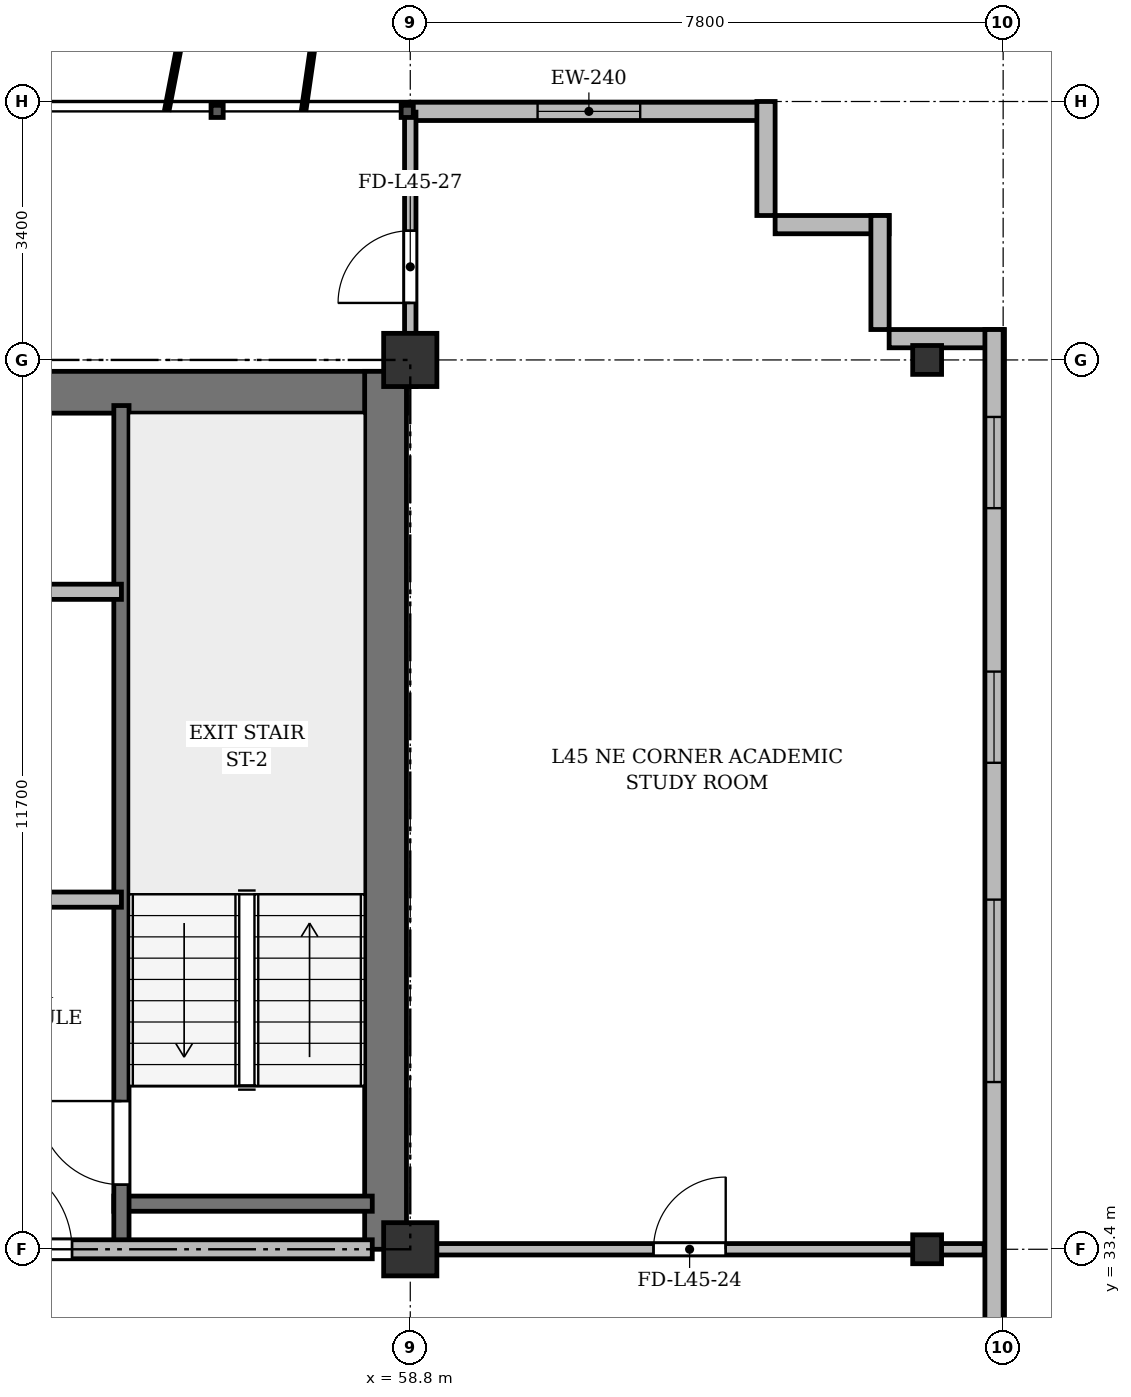
"""IFC4 building model, lengths in metres.
Left out: names, types, materials, properties, quantities, classifications, styles, units other than length and angle.
Written with IfcOpenShell. Run it as: python <this file> out.ifc"""

import sys

from ifc_helpers import new_model, si_unit, direction, frame, frame_2d, origin, origin_2d, place, context, subcontext, project, spatial, rectangle, i_section, extrude, source, transform, mapped, element, fill, save


model = new_model("IFC4")
c1 = context("Model", 3, precision=1e-05, world=origin(), true_north=direction((0.0, 1.0)))
c2 = subcontext(c1, "Body", "Model", "MODEL_VIEW")
j1 = project(units=[si_unit("LENGTHUNIT", "METRE"), si_unit("PLANEANGLEUNIT", "RADIAN")], contexts=[c1])
p1 = place(None, origin())
s1 = spatial("IfcSite", under=j1, at=p1, CompositionType="ELEMENT")
p2 = place(p1, origin())
s2 = spatial("IfcBuilding", under=s1, at=p2, CompositionType="ELEMENT")
p3 = place(p2, frame((0.0, 0.0, 171.7)))
s3 = spatial("IfcBuildingStorey", under=s2, at=p3, CompositionType="ELEMENT", Elevation=171.7)
m1 = source(origin(), c2, "Body", "SweptSolid", [
    extrude(rectangle(XDim=0.7, YDim=0.7, at=origin_2d()), origin(), (0.0, 0.0, 1.0), 3.6),
])
for number, where, z_axis, x_axis in (
    (1, (58.8, 33.4, 0.0), (0.0, 0.0, 1.0), (1.0, 0.0, 0.0)),
    (2, (58.8, 45.1, 0.0), (0.0, 0.0, 1.0), (1.0, 0.0, 0.0)),
):
    element("IfcColumn", number, at=place(p3, frame(where, z_axis=z_axis, x_axis=x_axis)), inside=s3, PredefinedType="COLUMN", context=c2, shape_type="MappedRepresentation", body=[
        mapped(m1, transform((0.0, 0.0, 0.0), x_axis=(1.0, 0.0, 0.0), y_axis=(0.0, 1.0, 0.0), z_axis=(0.0, 0.0, 1.0), scale=1.0)),
    ])
m2 = source(origin(), c2, "Body", "SweptSolid", [
    extrude(i_section(OverallWidth=0.38, OverallDepth=0.38, WebThickness=0.02, FlangeThickness=0.03, at=origin_2d()), origin(), (0.0, 0.0, 1.0), 3.6),
])
for number, where, z_axis, x_axis in (
    (3, (65.6, 33.4, 0.0), (0.0, 0.0, 1.0), (1.0, 0.0, 0.0)),
    (4, (65.6, 45.1, 0.0), (0.0, 0.0, 1.0), (1.0, 0.0, 0.0)),
):
    element("IfcColumn", number, at=place(p3, frame(where, z_axis=z_axis, x_axis=x_axis)), inside=s3, PredefinedType="COLUMN", context=c2, shape_type="MappedRepresentation", body=[
        mapped(m2, transform((0.0, 0.0, 0.0), x_axis=(1.0, 0.0, 0.0), y_axis=(0.0, 1.0, 0.0), z_axis=(0.0, 0.0, 1.0), scale=1.0)),
    ])
p4 = place(p3, frame((58.8, 48.37, 0.0), z_axis=(0.0, 0.0, 1.0), x_axis=(1.0, 0.0, 0.0)))
e5 = element("IfcWall", 5, at=p4, inside=s3, PredefinedType="SOLIDWALL", context=c2, shape_type="SweptSolid", body=[
    extrude(rectangle(XDim=4.7, YDim=0.24, at=frame_2d((2.35, 0.0))), origin(), (0.0, 0.0, 1.0), 3.35),
])
p5 = place(p4, frame((1.675, 0.0, 0.9)))
e6 = element("IfcOpeningElement", 6, at=p5, cuts=e5, PredefinedType="OPENING", context=c2, shape_type="SweptSolid", body=[
    extrude(rectangle(XDim=1.35, YDim=1.5, at=frame_2d((0.675, 0.75))), frame((0.0, 0.13, 0.0), z_axis=(0.0, -1.0, 0.0), x_axis=(1.0, 0.0, 0.0)), (0.0, 0.0, 1.0), 0.26),
])
for number, where, z_axis, x_axis in (
    (7, (63.48, 48.5, 0.0), (0.0, 0.0, 1.0), (0.0, -1.0, 0.0)),
    (8, (63.6, 46.88, 0.0), (0.0, 0.0, 1.0), (1.0, 0.0, 0.0)),
    (9, (64.98, 47.0, 0.0), (0.0, 0.0, 1.0), (0.0, -1.0, 0.0)),
    (10, (65.1, 45.38, 0.0), (0.0, 0.0, 1.0), (1.0, 0.0, 0.0)),
):
    element("IfcWall", number, at=place(p3, frame(where, z_axis=z_axis, x_axis=x_axis)), inside=s3, PredefinedType="SOLIDWALL", context=c2, shape_type="SweptSolid", body=[
        extrude(rectangle(XDim=1.5, YDim=0.24, at=frame_2d((0.75, 0.0))), origin(), (0.0, 0.0, 1.0), 3.35),
    ])
p6 = place(p3, frame((66.48, 45.5, 0.0), z_axis=(0.0, 0.0, 1.0), x_axis=(0.0, -1.0, 0.0)))
e11 = element("IfcWall", 11, at=p6, inside=s3, PredefinedType="SOLIDWALL", context=c2, shape_type="SweptSolid", body=[
    extrude(rectangle(XDim=39.2, YDim=0.24, at=frame_2d((19.6, 0.0))), origin(), (0.0, 0.0, 1.0), 3.35),
])
p7 = place(p6, frame((36.55, 0.0, 0.92)))
e12 = element("IfcOpeningElement", 12, at=p7, cuts=e11, PredefinedType="OPENING", context=c2, shape_type="SweptSolid", body=[
    extrude(rectangle(XDim=1.2, YDim=1.65, at=frame_2d((0.6, 0.825))), frame((0.0, 0.13, 0.0), z_axis=(0.0, -1.0, 0.0), x_axis=(1.0, 0.0, 0.0)), (0.0, 0.0, 1.0), 0.26),
])
p8 = place(p6, frame((32.9, 0.0, 0.92)))
e13 = element("IfcOpeningElement", 13, at=p8, cuts=e11, PredefinedType="OPENING", context=c2, shape_type="SweptSolid", body=[
    extrude(rectangle(XDim=2.4, YDim=2.1, at=frame_2d((1.2, 1.05))), frame((0.0, 0.13, 0.0), z_axis=(0.0, -1.0, 0.0), x_axis=(1.0, 0.0, 0.0)), (0.0, 0.0, 1.0), 0.26),
])
p9 = place(p6, frame((28.7, 0.0, 0.92)))
e14 = element("IfcOpeningElement", 14, at=p9, cuts=e11, PredefinedType="OPENING", context=c2, shape_type="SweptSolid", body=[
    extrude(rectangle(XDim=2.4, YDim=2.1, at=frame_2d((1.2, 1.05))), frame((0.0, 0.13, 0.0), z_axis=(0.0, -1.0, 0.0), x_axis=(1.0, 0.0, 0.0)), (0.0, 0.0, 1.0), 0.26),
])
p10 = place(p6, frame((21.5, 0.0, 0.92)))
e15 = element("IfcOpeningElement", 15, at=p10, cuts=e11, PredefinedType="OPENING", context=c2, shape_type="SweptSolid", body=[
    extrude(rectangle(XDim=2.4, YDim=2.1, at=frame_2d((1.2, 1.05))), frame((0.0, 0.13, 0.0), z_axis=(0.0, -1.0, 0.0), x_axis=(1.0, 0.0, 0.0)), (0.0, 0.0, 1.0), 0.26),
])
p11 = place(p6, frame((7.5, 0.0, 0.92)))
e16 = element("IfcOpeningElement", 16, at=p11, cuts=e11, PredefinedType="OPENING", context=c2, shape_type="SweptSolid", body=[
    extrude(rectangle(XDim=2.4, YDim=2.1, at=frame_2d((1.2, 1.05))), frame((0.0, 0.13, 0.0), z_axis=(0.0, -1.0, 0.0), x_axis=(1.0, 0.0, 0.0)), (0.0, 0.0, 1.0), 0.26),
])
p12 = place(p6, frame((4.5, 0.0, 0.92)))
e17 = element("IfcOpeningElement", 17, at=p12, cuts=e11, PredefinedType="OPENING", context=c2, shape_type="SweptSolid", body=[
    extrude(rectangle(XDim=1.2, YDim=1.65, at=frame_2d((0.6, 0.825))), frame((0.0, 0.13, 0.0), z_axis=(0.0, -1.0, 0.0), x_axis=(1.0, 0.0, 0.0)), (0.0, 0.0, 1.0), 0.26),
])
p13 = place(p6, frame((1.15, 0.0, 0.92)))
e18 = element("IfcOpeningElement", 18, at=p13, cuts=e11, PredefinedType="OPENING", context=c2, shape_type="SweptSolid", body=[
    extrude(rectangle(XDim=1.2, YDim=1.65, at=frame_2d((0.6, 0.825))), frame((0.0, 0.13, 0.0), z_axis=(0.0, -1.0, 0.0), x_axis=(1.0, 0.0, 0.0)), (0.0, 0.0, 1.0), 0.26),
])
p14 = place(p3, frame((15.65, 44.675, 0.0), z_axis=(0.0, 0.0, 1.0), x_axis=(1.0, 0.0, 0.0)))
e19 = element("IfcWall", 19, at=p14, inside=s3, PredefinedType="SHEAR", context=c2, shape_type="SweptSolid", body=[
    extrude(rectangle(XDim=43.1, YDim=0.55, at=frame_2d((21.55, 0.0))), origin(), (0.0, 0.0, 1.0), 3.35),
])
p15 = place(p3, frame((58.475, 33.4, 0.0), z_axis=(0.0, 0.0, 1.0), x_axis=(0.0, 1.0, 0.0)))
e20 = element("IfcWall", 20, at=p15, inside=s3, PredefinedType="SHEAR", context=c2, shape_type="SweptSolid", body=[
    extrude(rectangle(XDim=11.55, YDim=0.55, at=frame_2d((5.775, 0.0))), origin(), (0.0, 0.0, 1.0), 3.35),
])
p16 = place(p3, frame((54.9, 34.0, 0.0), z_axis=(0.0, 0.0, 1.0), x_axis=(1.0, 0.0, 0.0)))
e21 = element("IfcWall", 21, at=p16, inside=s3, PredefinedType="SHEAR", context=c2, shape_type="SweptSolid", body=[
    extrude(rectangle(XDim=3.4, YDim=0.2, at=frame_2d((1.7, 0.0))), origin(), (0.0, 0.0, 1.0), 3.35),
])
p17 = place(p3, frame((55.0, 33.4, 0.0), z_axis=(0.0, 0.0, 1.0), x_axis=(0.0, 1.0, 0.0)))
e22 = element("IfcWall", 22, at=p17, inside=s3, PredefinedType="SHEAR", context=c2, shape_type="SweptSolid", body=[
    extrude(rectangle(XDim=11.1, YDim=0.2, at=frame_2d((5.55, 0.0))), origin(), (0.0, 0.0, 1.0), 3.35),
])
p18 = place(p17, frame((0.85, 0.0, 0.0)))
e23 = element("IfcOpeningElement", 23, at=p18, cuts=e22, PredefinedType="OPENING", context=c2, shape_type="SweptSolid", body=[
    extrude(rectangle(XDim=1.1, YDim=2.15, at=frame_2d((0.55, 1.075))), frame((0.0, 0.11, 0.0), z_axis=(0.0, -1.0, 0.0), x_axis=(1.0, 0.0, 0.0)), (0.0, 0.0, 1.0), 0.22),
])
p19 = place(p3, frame((47.15, 42.05, 0.0), z_axis=(0.0, 0.0, 1.0), x_axis=(1.0, 0.0, 0.0)))
e24 = element("IfcWall", 24, at=p19, inside=s3, PredefinedType="SOLIDWALL", context=c2, shape_type="SweptSolid", body=[
    extrude(rectangle(XDim=7.85, YDim=0.2, at=frame_2d((3.925, 0.0))), origin(), (0.0, 0.0, 1.0), 2.85),
])
p20 = place(p19, frame((0.75, 0.0, 0.0)))
e25 = element("IfcOpeningElement", 25, at=p20, cuts=e24, PredefinedType="OPENING", context=c2, shape_type="SweptSolid", body=[
    extrude(rectangle(XDim=0.9, YDim=2.1, at=frame_2d((0.45, 1.05))), frame((0.0, 0.11, 0.0), z_axis=(0.0, -1.0, 0.0), x_axis=(1.0, 0.0, 0.0)), (0.0, 0.0, 1.0), 0.22),
])
p21 = place(p19, frame((3.85, 0.0, 0.0)))
e26 = element("IfcOpeningElement", 26, at=p21, cuts=e24, PredefinedType="OPENING", context=c2, shape_type="SweptSolid", body=[
    extrude(rectangle(XDim=0.9, YDim=2.1, at=frame_2d((0.45, 1.05))), frame((0.0, 0.11, 0.0), z_axis=(0.0, -1.0, 0.0), x_axis=(1.0, 0.0, 0.0)), (0.0, 0.0, 1.0), 0.22),
])
p22 = place(p3, frame((52.45, 38.0, 0.0), z_axis=(0.0, 0.0, 1.0), x_axis=(1.0, 0.0, 0.0)))
e27 = element("IfcWall", 27, at=p22, inside=s3, PredefinedType="PARTITIONING", context=c2, shape_type="SweptSolid", body=[
    extrude(rectangle(XDim=2.55, YDim=0.2, at=frame_2d((1.275, 0.0))), origin(), (0.0, 0.0, 1.0), 3.35),
])
p23 = place(p3, frame((47.15, 33.4, 0.0), z_axis=(0.0, 0.0, 1.0), x_axis=(1.0, 0.0, 0.0)))
e28 = element("IfcWall", 28, at=p23, inside=s3, PredefinedType="PARTITIONING", context=c2, shape_type="SweptSolid", body=[
    extrude(rectangle(XDim=11.15, YDim=0.25, at=frame_2d((5.575, 0.0))), origin(), (0.0, 0.0, 1.0), 2.75),
])
p24 = place(p23, frame((0.7, 0.0, 0.0)))
e29 = element("IfcOpeningElement", 29, at=p24, cuts=e28, PredefinedType="OPENING", context=c2, shape_type="SweptSolid", body=[
    extrude(rectangle(XDim=0.95, YDim=2.15, at=frame_2d((0.475, 1.075))), frame((0.0, 0.135, 0.0), z_axis=(0.0, -1.0, 0.0), x_axis=(1.0, 0.0, 0.0)), (0.0, 0.0, 1.0), 0.27),
])
p25 = place(p23, frame((6.0, 0.0, 0.0)))
e30 = element("IfcOpeningElement", 30, at=p25, cuts=e28, PredefinedType="OPENING", context=c2, shape_type="SweptSolid", body=[
    extrude(rectangle(XDim=1.2, YDim=2.15, at=frame_2d((0.6, 1.075))), frame((0.0, 0.135, 0.0), z_axis=(0.0, -1.0, 0.0), x_axis=(1.0, 0.0, 0.0)), (0.0, 0.0, 1.0), 0.27),
])
p26 = place(p3, frame((58.8, 33.4, 0.0), z_axis=(0.0, 0.0, 1.0), x_axis=(1.0, 0.0, 0.0)))
e31 = element("IfcWall", 31, at=p26, inside=s3, PredefinedType="PARTITIONING", context=c2, shape_type="SweptSolid", body=[
    extrude(rectangle(XDim=7.55, YDim=0.15, at=frame_2d((3.775, 0.0))), origin(), (0.0, 0.0, 1.0), 2.75),
])
p27 = place(p26, frame((3.2, 0.0, 0.0)))
e32 = element("IfcOpeningElement", 32, at=p27, cuts=e31, PredefinedType="OPENING", context=c2, shape_type="SweptSolid", body=[
    extrude(rectangle(XDim=0.95, YDim=2.15, at=frame_2d((0.475, 1.075))), frame((0.0, 0.085, 0.0), z_axis=(0.0, -1.0, 0.0), x_axis=(1.0, 0.0, 0.0)), (0.0, 0.0, 1.0), 0.17),
])
p28 = place(p3, frame((58.8, 44.75, 0.0), z_axis=(0.0, 0.0, 1.0), x_axis=(0.0, 1.0, 0.0)))
e33 = element("IfcWall", 33, at=p28, inside=s3, PredefinedType="PARTITIONING", context=c2, shape_type="SweptSolid", body=[
    extrude(rectangle(XDim=3.61, YDim=0.15, at=frame_2d((1.805, 0.0))), origin(), (0.0, 0.0, 1.0), 2.85),
])
p29 = place(p28, frame((1.1, 0.0, 0.0)))
e34 = element("IfcOpeningElement", 34, at=p29, cuts=e33, PredefinedType="OPENING", context=c2, shape_type="SweptSolid", body=[
    extrude(rectangle(XDim=0.95, YDim=2.15, at=frame_2d((0.475, 1.075))), frame((0.0, 0.085, 0.0), z_axis=(0.0, -1.0, 0.0), x_axis=(1.0, 0.0, 0.0)), (0.0, 0.0, 1.0), 0.17),
])
m3 = source(origin(), c2, "Body", "SweptSolid", [
    extrude(rectangle(XDim=1.35, YDim=1.5, at=frame_2d((0.675, 0.75))), frame((0.0, 0.03, 0.0), z_axis=(0.0, -1.0, 0.0), x_axis=(1.0, 0.0, 0.0)), (0.0, 0.0, 1.0), 0.06),
])
p30 = place(p5, origin())
e35 = element("IfcWindow", 35, at=p30, inside=s3, PartitioningType="SINGLE_PANEL", PredefinedType="WINDOW", context=c2, shape_type="MappedRepresentation", body=[
    mapped(m3, transform((0.0, 0.0, 0.0), x_axis=(1.0, 0.0, 0.0), y_axis=(0.0, 1.0, 0.0), z_axis=(0.0, 0.0, 1.0), scale=1.0)),
])
fill(e6, e35)
m4 = source(origin(), c2, "Body", "SweptSolid", [
    extrude(rectangle(XDim=2.4, YDim=2.1, at=frame_2d((1.2, 1.05))), frame((0.0, 0.03, 0.0), z_axis=(0.0, -1.0, 0.0), x_axis=(1.0, 0.0, 0.0)), (0.0, 0.0, 1.0), 0.06),
])
p31 = place(p11, origin())
e36 = element("IfcWindow", 36, at=p31, inside=s3, PartitioningType="SINGLE_PANEL", PredefinedType="WINDOW", context=c2, shape_type="MappedRepresentation", body=[
    mapped(m4, transform((0.0, 0.0, 0.0), x_axis=(1.0, 0.0, 0.0), y_axis=(0.0, 1.0, 0.0), z_axis=(0.0, 0.0, 1.0), scale=1.0)),
])
fill(e16, e36)
m5 = source(origin(), c2, "Body", "SweptSolid", [
    extrude(rectangle(XDim=1.2, YDim=1.65, at=frame_2d((0.6, 0.825))), frame((0.0, 0.03, 0.0), z_axis=(0.0, -1.0, 0.0), x_axis=(1.0, 0.0, 0.0)), (0.0, 0.0, 1.0), 0.06),
])
p32 = place(p12, origin())
e37 = element("IfcWindow", 37, at=p32, inside=s3, PartitioningType="SINGLE_PANEL", PredefinedType="WINDOW", context=c2, shape_type="MappedRepresentation", body=[
    mapped(m5, transform((0.0, 0.0, 0.0), x_axis=(1.0, 0.0, 0.0), y_axis=(0.0, 1.0, 0.0), z_axis=(0.0, 0.0, 1.0), scale=1.0)),
])
fill(e17, e37)
p33 = place(p13, origin())
e38 = element("IfcWindow", 38, at=p33, inside=s3, PartitioningType="SINGLE_PANEL", PredefinedType="WINDOW", context=c2, shape_type="MappedRepresentation", body=[
    mapped(m5, transform((0.0, 0.0, 0.0), x_axis=(1.0, 0.0, 0.0), y_axis=(0.0, 1.0, 0.0), z_axis=(0.0, 0.0, 1.0), scale=1.0)),
])
fill(e18, e38)
m6 = source(origin(), c2, "Body", "SweptSolid", [
    extrude(rectangle(XDim=1.1, YDim=2.15, at=frame_2d((0.55, 1.075))), frame((0.0, 0.025, 0.0), z_axis=(0.0, -1.0, 0.0), x_axis=(1.0, 0.0, 0.0)), (0.0, 0.0, 1.0), 0.05),
])
p34 = place(p18, origin())
e39 = element("IfcDoor", 39, at=p34, inside=s3, OperationType="SINGLE_SWING_RIGHT", PredefinedType="DOOR", context=c2, shape_type="MappedRepresentation", body=[
    mapped(m6, transform((0.0, 0.0, 0.0), x_axis=(1.0, 0.0, 0.0), y_axis=(0.0, 1.0, 0.0), z_axis=(0.0, 0.0, 1.0), scale=1.0)),
])
fill(e23, e39)
m7 = source(origin(), c2, "Body", "SweptSolid", [
    extrude(rectangle(XDim=1.2, YDim=2.15, at=frame_2d((0.6, 1.075))), frame((0.0, 0.025, 0.0), z_axis=(0.0, -1.0, 0.0), x_axis=(1.0, 0.0, 0.0)), (0.0, 0.0, 1.0), 0.05),
])
p35 = place(p25, origin())
e40 = element("IfcDoor", 40, at=p35, inside=s3, OperationType="SINGLE_SWING_LEFT", PredefinedType="DOOR", context=c2, shape_type="MappedRepresentation", body=[
    mapped(m7, transform((0.0, 0.0, 0.0), x_axis=(1.0, 0.0, 0.0), y_axis=(0.0, 1.0, 0.0), z_axis=(0.0, 0.0, 1.0), scale=1.0)),
])
fill(e30, e40)
m8 = source(origin(), c2, "Body", "SweptSolid", [
    extrude(rectangle(XDim=0.95, YDim=2.15, at=frame_2d((0.475, 1.075))), frame((0.0, 0.025, 0.0), z_axis=(0.0, -1.0, 0.0), x_axis=(1.0, 0.0, 0.0)), (0.0, 0.0, 1.0), 0.05),
])
p36 = place(p27, origin())
e41 = element("IfcDoor", 41, at=p36, inside=s3, OperationType="SINGLE_SWING_RIGHT", PredefinedType="DOOR", context=c2, shape_type="MappedRepresentation", body=[
    mapped(m8, transform((0.0, 0.0, 0.0), x_axis=(1.0, 0.0, 0.0), y_axis=(0.0, 1.0, 0.0), z_axis=(0.0, 0.0, 1.0), scale=1.0)),
])
fill(e32, e41)
p37 = place(p29, origin())
e42 = element("IfcDoor", 42, at=p37, inside=s3, OperationType="SINGLE_SWING_LEFT", PredefinedType="DOOR", context=c2, shape_type="MappedRepresentation", body=[
    mapped(m8, transform((0.0, 0.0, 0.0), x_axis=(1.0, 0.0, 0.0), y_axis=(0.0, 1.0, 0.0), z_axis=(0.0, 0.0, 1.0), scale=1.0)),
])
fill(e34, e42)
save(model, sys.argv[1])
